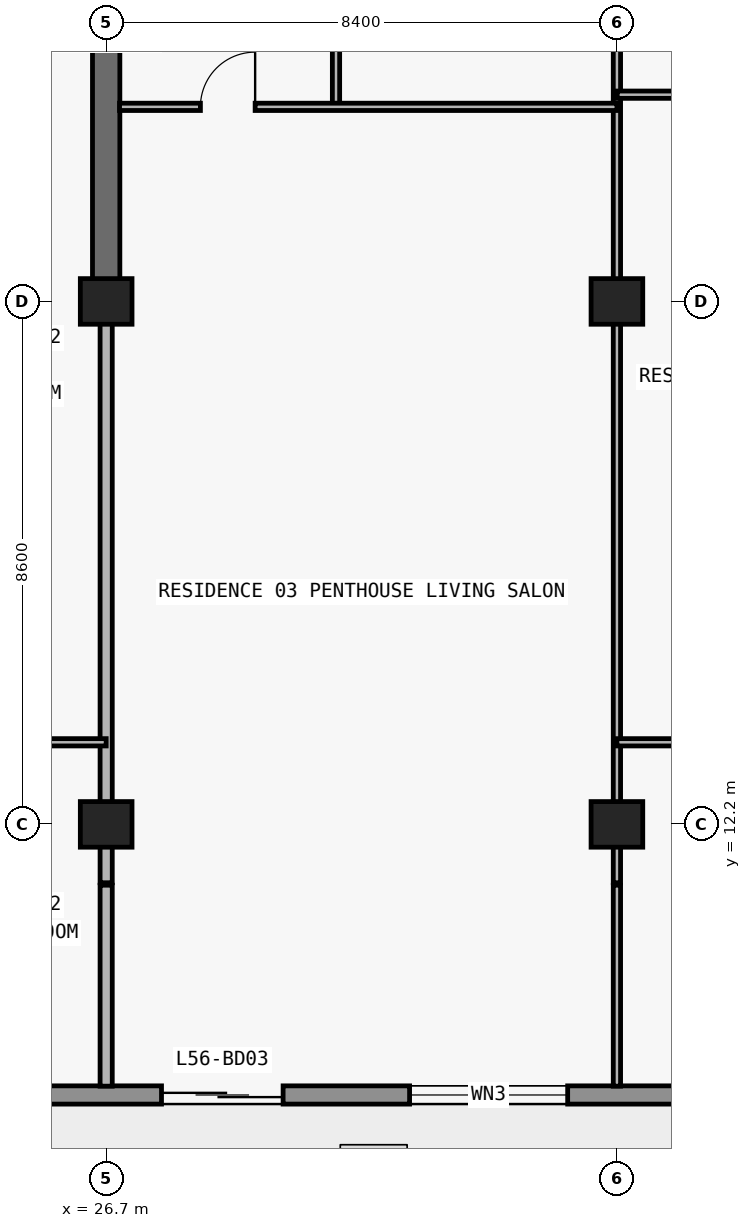
"""IFC4 building model, lengths in metres.
Left out: names, types, materials, properties, quantities, classifications, styles, units other than length and angle.
Written with IfcOpenShell. Run it as: python <this file> out.ifc"""

import sys

from ifc_helpers import new_model, si_unit, direction, frame, frame_2d, origin, origin_2d, place, context, subcontext, project, spatial, rectangle, extrude, element, fill, save


model = new_model("IFC4")
c1 = context("Model", 3, precision=1e-05, world=origin(), true_north=direction((0.0, 1.0)))
c2 = subcontext(c1, "Body", "Model", "MODEL_VIEW")
j1 = project(units=[si_unit("LENGTHUNIT", "METRE"), si_unit("PLANEANGLEUNIT", "RADIAN")], contexts=[c1])
p1 = place(None, origin())
s1 = spatial("IfcSite", under=j1, at=p1, CompositionType="ELEMENT")
p2 = place(p1, origin())
s2 = spatial("IfcBuilding", under=s1, at=p2, CompositionType="ELEMENT")
p3 = place(p2, frame((0.0, 0.0, 201.6)))
s3 = spatial("IfcBuildingStorey", under=s2, at=p3, CompositionType="ELEMENT", Elevation=201.6)
for number, where, z_axis, x_axis in (
    (1, (26.7, 12.2, 0.0), (0.0, 0.0, 1.0), (1.0, 0.0, 0.0)),
    (2, (35.1, 12.2, 0.0), (0.0, 0.0, 1.0), (1.0, 0.0, 0.0)),
    (3, (26.7, 20.8, 0.0), (0.0, 0.0, 1.0), (1.0, 0.0, 0.0)),
    (4, (35.1, 20.8, 0.0), (0.0, 0.0, 1.0), (1.0, 0.0, 0.0)),
):
    element("IfcColumn", number, at=place(p3, frame(where, z_axis=z_axis, x_axis=x_axis)), inside=s3, PredefinedType="COLUMN", context=c2, shape_type="SweptSolid", body=[
        extrude(rectangle(XDim=0.85, YDim=0.75, at=origin_2d()), origin(), (0.0, 0.0, 1.0), 3.05),
    ])
p4 = place(p3, frame((26.7, 20.8, 0.0), z_axis=(0.0, 0.0, 1.0), x_axis=(0.0, 1.0, 0.0)))
e5 = element("IfcWall", 5, at=p4, inside=s3, PredefinedType="SHEAR", context=c2, shape_type="SweptSolid", body=[
    extrude(rectangle(XDim=8.6, YDim=0.45, at=frame_2d((4.3, 0.0))), origin(), (0.0, 0.0, 1.0), 3.05),
])
p5 = place(p3, frame((67.7, 7.75, 0.0), z_axis=(0.0, 0.0, 1.0), x_axis=(-1.0, 0.0, 0.0)))
e6 = element("IfcWall", 6, at=p5, inside=s3, PredefinedType="STANDARD", context=c2, shape_type="SweptSolid", body=[
    extrude(rectangle(XDim=57.6, YDim=0.3, at=frame_2d((28.8, 0.0))), origin(), (0.0, 0.0, 1.0), 3.05),
])
p6 = place(p5, frame((54.673, 0.0, 0.0)))
e7 = element("IfcOpeningElement", 7, at=p6, cuts=e6, PredefinedType="OPENING", context=c2, shape_type="SweptSolid", body=[
    extrude(rectangle(XDim=2.0, YDim=2.3, at=frame_2d((1.0, 1.15))), frame((0.0, 0.16, 0.0), z_axis=(0.0, -1.0, 0.0), x_axis=(1.0, 0.0, 0.0)), (0.0, 0.0, 1.0), 0.32),
])
p7 = place(p5, frame((50.473, 0.0, 0.85)))
e8 = element("IfcOpeningElement", 8, at=p7, cuts=e6, PredefinedType="OPENING", context=c2, shape_type="SweptSolid", body=[
    extrude(rectangle(XDim=2.2, YDim=1.55, at=frame_2d((1.1, 0.775))), frame((0.0, 0.16, 0.0), z_axis=(0.0, -1.0, 0.0), x_axis=(1.0, 0.0, 0.0)), (0.0, 0.0, 1.0), 0.32),
])
p8 = place(p5, frame((46.09, 0.0, 0.0)))
e9 = element("IfcOpeningElement", 9, at=p8, cuts=e6, PredefinedType="OPENING", context=c2, shape_type="SweptSolid", body=[
    extrude(rectangle(XDim=2.0, YDim=2.3, at=frame_2d((1.0, 1.15))), frame((0.0, 0.16, 0.0), z_axis=(0.0, -1.0, 0.0), x_axis=(1.0, 0.0, 0.0)), (0.0, 0.0, 1.0), 0.32),
])
p9 = place(p5, frame((41.99, 0.0, 0.85)))
e10 = element("IfcOpeningElement", 10, at=p9, cuts=e6, PredefinedType="OPENING", context=c2, shape_type="SweptSolid", body=[
    extrude(rectangle(XDim=1.8, YDim=1.55, at=frame_2d((0.9, 0.775))), frame((0.0, 0.16, 0.0), z_axis=(0.0, -1.0, 0.0), x_axis=(1.0, 0.0, 0.0)), (0.0, 0.0, 1.0), 0.32),
])
p10 = place(p5, frame((38.09, 0.0, 0.0)))
e11 = element("IfcOpeningElement", 11, at=p10, cuts=e6, PredefinedType="OPENING", context=c2, shape_type="SweptSolid", body=[
    extrude(rectangle(XDim=2.0, YDim=2.3, at=frame_2d((1.0, 1.15))), frame((0.0, 0.16, 0.0), z_axis=(0.0, -1.0, 0.0), x_axis=(1.0, 0.0, 0.0)), (0.0, 0.0, 1.0), 0.32),
])
p11 = place(p5, frame((33.41, 0.0, 0.65)))
e12 = element("IfcOpeningElement", 12, at=p11, cuts=e6, PredefinedType="OPENING", context=c2, shape_type="SweptSolid", body=[
    extrude(rectangle(XDim=2.6, YDim=1.85, at=frame_2d((1.3, 0.925))), frame((0.0, 0.16, 0.0), z_axis=(0.0, -1.0, 0.0), x_axis=(1.0, 0.0, 0.0)), (0.0, 0.0, 1.0), 0.32),
])
p12 = place(p5, frame((27.7, 0.0, 0.85)))
e13 = element("IfcOpeningElement", 13, at=p12, cuts=e6, PredefinedType="OPENING", context=c2, shape_type="SweptSolid", body=[
    extrude(rectangle(XDim=2.2, YDim=1.55, at=frame_2d((1.1, 0.775))), frame((0.0, 0.16, 0.0), z_axis=(0.0, -1.0, 0.0), x_axis=(1.0, 0.0, 0.0)), (0.0, 0.0, 1.0), 0.32),
])
p13 = place(p5, frame((19.7, 0.0, 0.85)))
e14 = element("IfcOpeningElement", 14, at=p13, cuts=e6, PredefinedType="OPENING", context=c2, shape_type="SweptSolid", body=[
    extrude(rectangle(XDim=2.2, YDim=1.55, at=frame_2d((1.1, 0.775))), frame((0.0, 0.16, 0.0), z_axis=(0.0, -1.0, 0.0), x_axis=(1.0, 0.0, 0.0)), (0.0, 0.0, 1.0), 0.32),
])
p14 = place(p5, frame((13.69, 0.0, 0.0)))
e15 = element("IfcOpeningElement", 15, at=p14, cuts=e6, PredefinedType="OPENING", context=c2, shape_type="SweptSolid", body=[
    extrude(rectangle(XDim=2.0, YDim=2.3, at=frame_2d((1.0, 1.15))), frame((0.0, 0.16, 0.0), z_axis=(0.0, -1.0, 0.0), x_axis=(1.0, 0.0, 0.0)), (0.0, 0.0, 1.0), 0.32),
])
p15 = place(p5, frame((9.01, 0.0, 0.65)))
e16 = element("IfcOpeningElement", 16, at=p15, cuts=e6, PredefinedType="OPENING", context=c2, shape_type="SweptSolid", body=[
    extrude(rectangle(XDim=2.6, YDim=1.85, at=frame_2d((1.3, 0.925))), frame((0.0, 0.16, 0.0), z_axis=(0.0, -1.0, 0.0), x_axis=(1.0, 0.0, 0.0)), (0.0, 0.0, 1.0), 0.32),
])
p16 = place(p5, frame((3.0, 0.0, 0.85)))
e17 = element("IfcOpeningElement", 17, at=p16, cuts=e6, PredefinedType="OPENING", context=c2, shape_type="SweptSolid", body=[
    extrude(rectangle(XDim=2.2, YDim=1.55, at=frame_2d((1.1, 0.775))), frame((0.0, 0.16, 0.0), z_axis=(0.0, -1.0, 0.0), x_axis=(1.0, 0.0, 0.0)), (0.0, 0.0, 1.0), 0.32),
])
p17 = place(p3, frame((26.7, 7.895, 0.0), z_axis=(0.0, 0.0, 1.0), x_axis=(0.0, 1.0, 0.0)))
e18 = element("IfcWall", 18, at=p17, inside=s3, PredefinedType="PARTITIONING", context=c2, shape_type="SweptSolid", body=[
    extrude(rectangle(XDim=3.305, YDim=0.2, at=frame_2d((1.652, 0.0))), origin(), (0.0, 0.0, 1.0), 3.05),
])
p18 = place(p3, frame((26.7, 11.24, 0.0), z_axis=(0.0, 0.0, 1.0), x_axis=(0.0, 1.0, 0.0)))
e19 = element("IfcWall", 19, at=p18, inside=s3, PredefinedType="PARTITIONING", context=c2, shape_type="SweptSolid", body=[
    extrude(rectangle(XDim=9.555, YDim=0.2, at=frame_2d((4.777, 0.0))), origin(), (0.0, 0.0, 1.0), 2.263),
])
p19 = place(p3, frame((30.48, 24.0, 0.0), z_axis=(0.0, 0.0, 1.0), x_axis=(0.0, 1.0, 0.0)))
e20 = element("IfcWall", 20, at=p19, inside=s3, PredefinedType="PARTITIONING", context=c2, shape_type="SweptSolid", body=[
    extrude(rectangle(XDim=4.8, YDim=0.12, at=frame_2d((2.4, 0.0))), origin(), (0.0, 0.0, 1.0), 3.05),
])
p20 = place(p19, frame((1.95, 0.0, 0.0)))
e21 = element("IfcOpeningElement", 21, at=p20, cuts=e20, PredefinedType="OPENING", context=c2, shape_type="SweptSolid", body=[
    extrude(rectangle(XDim=0.9, YDim=2.15, at=frame_2d((0.45, 1.075))), frame((0.0, 0.07, 0.0), z_axis=(0.0, -1.0, 0.0), x_axis=(1.0, 0.0, 0.0)), (0.0, 0.0, 1.0), 0.14),
])
p21 = place(p3, frame((35.1, 7.895, 0.0), z_axis=(0.0, 0.0, 1.0), x_axis=(0.0, 1.0, 0.0)))
e22 = element("IfcWall", 22, at=p21, inside=s3, PredefinedType="PARTITIONING", context=c2, shape_type="SweptSolid", body=[
    extrude(rectangle(XDim=3.305, YDim=0.12, at=frame_2d((1.652, 0.0))), origin(), (0.0, 0.0, 1.0), 3.05),
])
p22 = place(p3, frame((35.1, 11.24, 0.0), z_axis=(0.0, 0.0, 1.0), x_axis=(0.0, 1.0, 0.0)))
e23 = element("IfcWall", 23, at=p22, inside=s3, PredefinedType="PARTITIONING", context=c2, shape_type="SweptSolid", body=[
    extrude(rectangle(XDim=23.46, YDim=0.12, at=frame_2d((11.73, 0.0))), origin(), (0.0, 0.0, 1.0), 2.263),
])
p23 = place(p22, frame((14.71, 0.0, 0.0)))
e24 = element("IfcOpeningElement", 24, at=p23, cuts=e23, PredefinedType="OPENING", context=c2, shape_type="SweptSolid", body=[
    extrude(rectangle(XDim=0.9, YDim=2.15, at=frame_2d((0.45, 1.075))), frame((0.0, 0.07, 0.0), z_axis=(0.0, -1.0, 0.0), x_axis=(1.0, 0.0, 0.0)), (0.0, 0.0, 1.0), 0.14),
])
p24 = place(p3, frame((22.92, 13.55, 0.0), z_axis=(0.0, 0.0, 1.0), x_axis=(1.0, 0.0, 0.0)))
e25 = element("IfcWall", 25, at=p24, inside=s3, PredefinedType="PARTITIONING", context=c2, shape_type="SweptSolid", body=[
    extrude(rectangle(XDim=3.78, YDim=0.12, at=frame_2d((1.89, 0.0))), origin(), (0.0, 0.0, 1.0), 3.05),
])
p25 = place(p24, frame((1.44, 0.0, 0.0)))
e26 = element("IfcOpeningElement", 26, at=p25, cuts=e25, PredefinedType="OPENING", context=c2, shape_type="SweptSolid", body=[
    extrude(rectangle(XDim=0.9, YDim=2.15, at=frame_2d((0.45, 1.075))), frame((0.0, 0.07, 0.0), z_axis=(0.0, -1.0, 0.0), x_axis=(1.0, 0.0, 0.0)), (0.0, 0.0, 1.0), 0.14),
])
p26 = place(p3, frame((35.1, 13.55, 0.0), z_axis=(0.0, 0.0, 1.0), x_axis=(1.0, 0.0, 0.0)))
e27 = element("IfcWall", 27, at=p26, inside=s3, PredefinedType="PARTITIONING", context=c2, shape_type="SweptSolid", body=[
    extrude(rectangle(XDim=6.026, YDim=0.12, at=frame_2d((3.013, 0.0))), origin(), (0.0, 0.0, 1.0), 3.05),
])
p27 = place(p26, frame((2.563, 0.0, 0.0)))
e28 = element("IfcOpeningElement", 28, at=p27, cuts=e27, PredefinedType="OPENING", context=c2, shape_type="SweptSolid", body=[
    extrude(rectangle(XDim=0.9, YDim=2.15, at=frame_2d((0.45, 1.075))), frame((0.0, 0.07, 0.0), z_axis=(0.0, -1.0, 0.0), x_axis=(1.0, 0.0, 0.0)), (0.0, 0.0, 1.0), 0.14),
])
p28 = place(p3, frame((26.92, 24.0, 0.0), z_axis=(0.0, 0.0, 1.0), x_axis=(1.0, 0.0, 0.0)))
e29 = element("IfcWall", 29, at=p28, inside=s3, PredefinedType="PARTITIONING", context=c2, shape_type="SweptSolid", body=[
    extrude(rectangle(XDim=8.18, YDim=0.12, at=frame_2d((4.09, 0.0))), origin(), (0.0, 0.0, 1.0), 3.05),
])
p29 = place(p28, frame((1.33, 0.0, 0.0)))
e30 = element("IfcOpeningElement", 30, at=p29, cuts=e29, PredefinedType="OPENING", context=c2, shape_type="SweptSolid", body=[
    extrude(rectangle(XDim=0.9, YDim=2.15, at=frame_2d((0.45, 1.075))), frame((0.0, 0.07, 0.0), z_axis=(0.0, -1.0, 0.0), x_axis=(1.0, 0.0, 0.0)), (0.0, 0.0, 1.0), 0.14),
])
p30 = place(p3, frame((35.105, 24.2, 0.0), z_axis=(0.0, 0.0, 1.0), x_axis=(1.0, 0.0, 0.0)))
e31 = element("IfcWall", 31, at=p30, inside=s3, PredefinedType="PARTITIONING", context=c2, shape_type="SweptSolid", body=[
    extrude(rectangle(XDim=6.021, YDim=0.12, at=frame_2d((3.01, 0.0))), origin(), (0.0, 0.0, 1.0), 3.05),
])
p31 = place(p30, frame((2.561, 0.0, 0.0)))
e32 = element("IfcOpeningElement", 32, at=p31, cuts=e31, PredefinedType="OPENING", context=c2, shape_type="SweptSolid", body=[
    extrude(rectangle(XDim=0.9, YDim=2.15, at=frame_2d((0.45, 1.075))), frame((0.0, 0.07, 0.0), z_axis=(0.0, -1.0, 0.0), x_axis=(1.0, 0.0, 0.0)), (0.0, 0.0, 1.0), 0.14),
])
p32 = place(p10, origin())
e33 = element("IfcDoor", 33, at=p32, inside=s3, OperationType="DOUBLE_DOOR_SLIDING", PredefinedType="DOOR", context=c2, shape_type="SweptSolid", body=[
    extrude(rectangle(XDim=2.0, YDim=2.3, at=frame_2d((1.0, 1.15))), frame((0.0, 0.025, 0.0), z_axis=(0.0, -1.0, 0.0), x_axis=(1.0, 0.0, 0.0)), (0.0, 0.0, 1.0), 0.05),
])
fill(e11, e33)
p33 = place(p11, origin())
e34 = element("IfcWindow", 34, at=p33, inside=s3, PartitioningType="SINGLE_PANEL", PredefinedType="WINDOW", context=c2, shape_type="SweptSolid", body=[
    extrude(rectangle(XDim=2.6, YDim=1.85, at=frame_2d((1.3, 0.925))), frame((0.0, 0.03, 0.0), z_axis=(0.0, -1.0, 0.0), x_axis=(1.0, 0.0, 0.0)), (0.0, 0.0, 1.0), 0.06),
])
fill(e12, e34)
p34 = place(p29, origin())
e35 = element("IfcDoor", 35, at=p34, inside=s3, OperationType="SINGLE_SWING_RIGHT", PredefinedType="DOOR", context=c2, shape_type="SweptSolid", body=[
    extrude(rectangle(XDim=0.9, YDim=2.15, at=frame_2d((0.45, 1.075))), frame((0.0, 0.025, 0.0), z_axis=(0.0, -1.0, 0.0), x_axis=(1.0, 0.0, 0.0)), (0.0, 0.0, 1.0), 0.05),
])
fill(e30, e35)
save(model, sys.argv[1])
